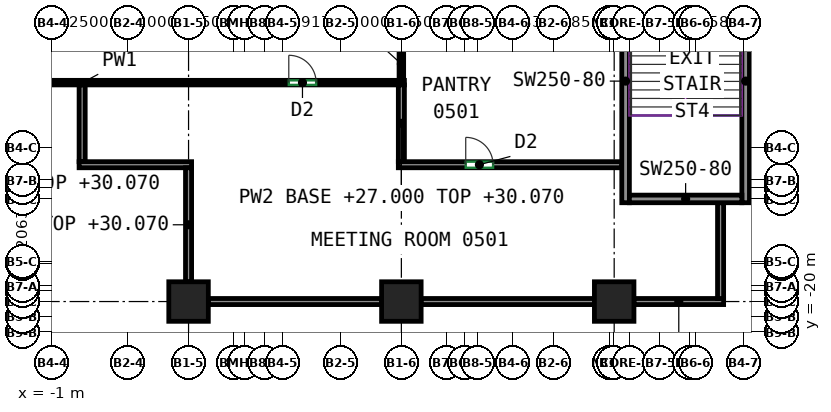
"""IFC4 building model, lengths in metres.
Left out: names, types, materials, properties, quantities, classifications, styles, units other than length and angle.
Written with IfcOpenShell. Run it as: python <this file> out.ifc"""

import sys

from ifc_helpers import new_model, si_unit, direction, frame, frame_2d, origin, origin_2d, place, context, subcontext, project, spatial, rectangle, extrude, source, transform, mapped, element, fill, save


model = new_model("IFC4")
c1 = context("Model", 3, precision=1e-05, world=origin(), true_north=direction((0.0, 1.0)))
c2 = subcontext(c1, "Body", "Model", "MODEL_VIEW")
j1 = project(units=[si_unit("LENGTHUNIT", "METRE"), si_unit("PLANEANGLEUNIT", "RADIAN")], contexts=[c1])
p1 = place(None, origin())
s1 = spatial("IfcSite", under=j1, at=p1, CompositionType="ELEMENT")
p2 = place(p1, origin())
s2 = spatial("IfcBuilding", under=s1, at=p2, CompositionType="ELEMENT")
p3 = place(p2, frame((0.0, 0.0, 27.0)))
s3 = spatial("IfcBuildingStorey", under=s2, at=p3, CompositionType="ELEMENT", Elevation=27.0)
m1 = source(origin(), c2, "Body", "SweptSolid", [
    extrude(rectangle(XDim=1.3, YDim=1.3, at=origin_2d()), origin(), (0.0, 0.0, 1.0), 3.72),
])
for number, where, z_axis, x_axis in (
    (1, (3.5, -19.0, 0.0), (0.0, 0.0, 1.0), (1.0, 0.0, 0.0)),
    (2, (10.5, -19.0, 0.0), (0.0, 0.0, 1.0), (1.0, 0.0, 0.0)),
    (3, (17.5, -19.0, 0.0), (0.0, 0.0, 1.0), (1.0, 0.0, 0.0)),
):
    element("IfcColumn", number, at=place(p3, frame(where, z_axis=z_axis, x_axis=x_axis)), inside=s3, PredefinedType="COLUMN", context=c2, shape_type="MappedRepresentation", body=[
        mapped(m1, transform((0.0, 0.0, 0.0))),
    ])
m2 = source(origin(), c2, "Body", "SweptSolid", [
    extrude(rectangle(XDim=8.0, YDim=0.25, at=frame_2d((4.0, 0.0))), origin(), (0.0, 0.0, 1.0), 3.72),
])
for number, where, z_axis, x_axis in (
    (4, (17.875, -15.75, 0.0), (0.0, 0.0, 1.0), (0.0, 1.0, 0.0)),
    (5, (21.825, -15.75, 0.0), (0.0, 0.0, 1.0), (0.0, 1.0, 0.0)),
):
    element("IfcWall", number, at=place(p3, frame(where, z_axis=z_axis, x_axis=x_axis)), inside=s3, PredefinedType="SHEAR", context=c2, shape_type="MappedRepresentation", body=[
        mapped(m2, transform((0.0, 0.0, 0.0))),
    ])
m3 = source(origin(), c2, "Body", "SweptSolid", [
    extrude(rectangle(XDim=3.7, YDim=0.25, at=frame_2d((1.85, 0.0))), origin(), (0.0, 0.0, 1.0), 3.72),
])
p4 = place(p3, frame((18.0, -15.625, 0.0), z_axis=(0.0, 0.0, 1.0), x_axis=(1.0, 0.0, 0.0)))
e6 = element("IfcWall", 6, at=p4, inside=s3, PredefinedType="SHEAR", context=c2, shape_type="MappedRepresentation", body=[
    mapped(m3, transform((0.0, 0.0, 0.0))),
])
p5 = place(p3, frame((-10.575, -11.8, 0.0), z_axis=(0.0, 0.0, 1.0), x_axis=(1.0, 0.0, 0.0)))
e7 = element("IfcWall", 7, at=p5, inside=s3, PredefinedType="PARTITIONING", context=c2, shape_type="SweptSolid", body=[
    extrude(rectangle(XDim=21.175, YDim=0.15, at=frame_2d((10.587, 0.0))), origin(), (0.0, 0.0, 1.0), 3.72),
])
p6 = place(p5, frame((4.544, 0.0, 0.0)))
e8 = element("IfcOpeningElement", 8, at=p6, cuts=e7, PredefinedType="OPENING", context=c2, shape_type="SweptSolid", body=[
    extrude(rectangle(XDim=1.8, YDim=2.1, at=frame_2d((0.9, 1.05))), frame((0.0, 0.085, 0.0), z_axis=(0.0, -1.0, 0.0), x_axis=(1.0, 0.0, 0.0)), (0.0, 0.0, 1.0), 0.17),
])
p7 = place(p5, frame((17.372, 0.0, 0.0)))
e9 = element("IfcOpeningElement", 9, at=p7, cuts=e7, PredefinedType="OPENING", context=c2, shape_type="SweptSolid", body=[
    extrude(rectangle(XDim=0.9, YDim=2.1, at=frame_2d((0.45, 1.05))), frame((0.0, 0.085, 0.0), z_axis=(0.0, -1.0, 0.0), x_axis=(1.0, 0.0, 0.0)), (0.0, 0.0, 1.0), 0.17),
])
p8 = place(p3, frame((10.5, -11.725, 0.0), z_axis=(0.0, 0.0, 1.0), x_axis=(0.0, 1.0, 0.0)))
e10 = element("IfcWall", 10, at=p8, inside=s3, PredefinedType="PARTITIONING", context=c2, shape_type="SweptSolid", body=[
    extrude(rectangle(XDim=1.075, YDim=0.15, at=frame_2d((0.538, 0.0))), origin(), (0.0, 0.0, 1.0), 3.07),
])
p9 = place(p3, frame((0.0, -14.4, 0.0), z_axis=(0.0, 0.0, 1.0), x_axis=(0.0, 1.0, 0.0)))
e11 = element("IfcWall", 11, at=p9, inside=s3, PredefinedType="PARTITIONING", context=c2, shape_type="SweptSolid", body=[
    extrude(rectangle(XDim=2.524, YDim=0.2, at=frame_2d((1.262, 0.0))), origin(), (0.0, 0.0, 1.0), 3.72),
])
p10 = place(p3, frame((-0.1, -14.5, 0.0), z_axis=(0.0, 0.0, 1.0), x_axis=(1.0, 0.0, 0.0)))
e12 = element("IfcWall", 12, at=p10, inside=s3, PredefinedType="PARTITIONING", context=c2, shape_type="SweptSolid", body=[
    extrude(rectangle(XDim=3.7, YDim=0.2, at=frame_2d((1.85, 0.0))), origin(), (0.0, 0.0, 1.0), 3.72),
])
p11 = place(p3, frame((3.5, -18.35, 0.0), z_axis=(0.0, 0.0, 1.0), x_axis=(0.0, 1.0, 0.0)))
e13 = element("IfcWall", 13, at=p11, inside=s3, PredefinedType="PARTITIONING", context=c2, shape_type="SweptSolid", body=[
    extrude(rectangle(XDim=3.75, YDim=0.2, at=frame_2d((1.875, 0.0))), origin(), (0.0, 0.0, 1.0), 3.07),
])
for number, where, z_axis, x_axis in (
    (14, (4.15, -19.0, 0.0), (0.0, 0.0, 1.0), (1.0, 0.0, 0.0)),
    (15, (11.15, -19.0, 0.0), (0.0, 0.0, 1.0), (1.0, 0.0, 0.0)),
):
    element("IfcWall", number, at=place(p3, frame(where, z_axis=z_axis, x_axis=x_axis)), inside=s3, PredefinedType="PARTITIONING", context=c2, shape_type="SweptSolid", body=[
        extrude(rectangle(XDim=5.7, YDim=0.2, at=frame_2d((2.85, 0.0))), origin(), (0.0, 0.0, 1.0), 3.72),
    ])
p12 = place(p3, frame((18.15, -19.0, 0.0), z_axis=(0.0, 0.0, 1.0), x_axis=(1.0, 0.0, 0.0)))
e16 = element("IfcWall", 16, at=p12, inside=s3, PredefinedType="PARTITIONING", context=c2, shape_type="SweptSolid", body=[
    extrude(rectangle(XDim=2.95, YDim=0.2, at=frame_2d((1.475, 0.0))), origin(), (0.0, 0.0, 1.0), 3.07),
])
p13 = place(p3, frame((21.0, -15.75, 0.0), z_axis=(0.0, 0.0, 1.0), x_axis=(0.0, -1.0, 0.0)))
e17 = element("IfcWall", 17, at=p13, inside=s3, PredefinedType="PARTITIONING", context=c2, shape_type="SweptSolid", body=[
    extrude(rectangle(XDim=3.15, YDim=0.2, at=frame_2d((1.575, 0.0))), origin(), (0.0, 0.0, 1.0), 3.72),
])
p14 = place(p3, frame((21.95, -14.5, 0.0), z_axis=(0.0, 0.0, 1.0), x_axis=(1.0, 0.0, 0.0)))
e18 = element("IfcWall", 18, at=p14, inside=s3, PredefinedType="PARTITIONING", context=c2, shape_type="SweptSolid", body=[
    extrude(rectangle(XDim=5.8, YDim=0.2, at=frame_2d((2.9, 0.0))), origin(), (0.0, 0.0, 1.0), 3.72),
])
p15 = place(p3, frame((10.5, -14.4, 0.0), z_axis=(0.0, 0.0, 1.0), x_axis=(0.0, 1.0, 0.0)))
e19 = element("IfcWall", 19, at=p15, inside=s3, PredefinedType="PARTITIONING", context=c2, shape_type="SweptSolid", body=[
    extrude(rectangle(XDim=2.524, YDim=0.2, at=frame_2d((1.262, 0.0))), origin(), (0.0, 0.0, 1.0), 3.07),
])
p16 = place(p3, frame((10.4, -14.5, 0.0), z_axis=(0.0, 0.0, 1.0), x_axis=(1.0, 0.0, 0.0)))
e20 = element("IfcWall", 20, at=p16, inside=s3, PredefinedType="PARTITIONING", context=c2, shape_type="SweptSolid", body=[
    extrude(rectangle(XDim=7.35, YDim=0.2, at=frame_2d((3.675, 0.0))), origin(), (0.0, 0.0, 1.0), 3.72),
])
p17 = place(p16, frame((2.217, 0.0, 0.0)))
e21 = element("IfcOpeningElement", 21, at=p17, cuts=e20, PredefinedType="OPENING", context=c2, shape_type="SweptSolid", body=[
    extrude(rectangle(XDim=0.9, YDim=2.1, at=frame_2d((0.45, 1.05))), frame((0.0, 0.11, 0.0), z_axis=(0.0, -1.0, 0.0), x_axis=(1.0, 0.0, 0.0)), (0.0, 0.0, 1.0), 0.22),
])
p18 = place(p17, origin())
e22 = element("IfcDoor", 22, at=p18, inside=s3, OperationType="SINGLE_SWING_LEFT", PredefinedType="DOOR", context=c2, shape_type="SweptSolid", body=[
    extrude(rectangle(XDim=0.9, YDim=2.1, at=frame_2d((0.45, 1.05))), frame((0.0, 0.025, 0.0), z_axis=(0.0, -1.0, 0.0), x_axis=(1.0, 0.0, 0.0)), (0.0, 0.0, 1.0), 0.05),
])
fill(e21, e22)
p19 = place(p7, origin())
e23 = element("IfcDoor", 23, at=p19, inside=s3, OperationType="SINGLE_SWING_LEFT", PredefinedType="DOOR", context=c2, shape_type="SweptSolid", body=[
    extrude(rectangle(XDim=0.9, YDim=2.1, at=frame_2d((0.45, 1.05))), frame((0.0, 0.025, 0.0), z_axis=(0.0, -1.0, 0.0), x_axis=(1.0, 0.0, 0.0)), (0.0, 0.0, 1.0), 0.05),
])
fill(e9, e23)
save(model, sys.argv[1])
